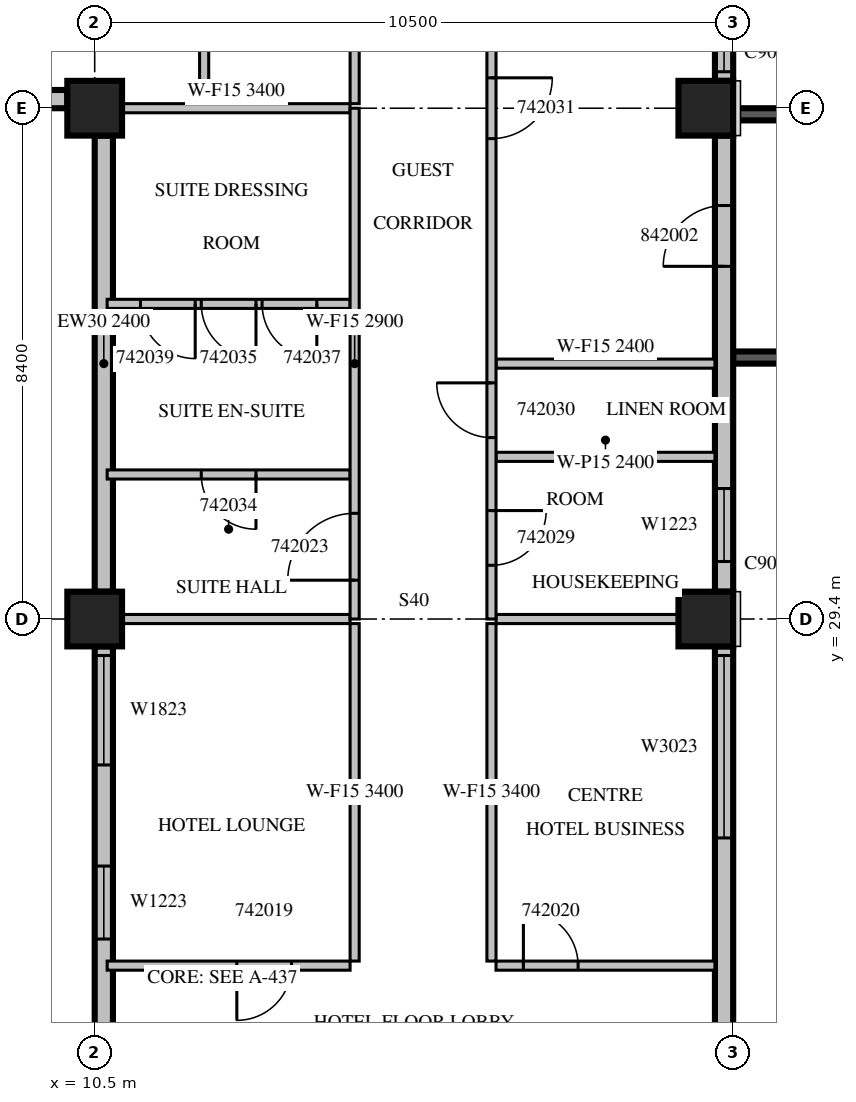
"""IFC4 building model, lengths in metres.
Left out: names, types, materials, properties, quantities, classifications, styles, units other than length and angle.
Written with IfcOpenShell. Run it as: python <this file> out.ifc"""

import sys

from ifc_helpers import new_model, si_unit, direction, frame, frame_2d, origin, origin_2d, place, context, subcontext, project, spatial, rectangle, extrude, source, transform, mapped, element, fill, save


model = new_model("IFC4")
c1 = context("Model", 3, precision=1e-05, world=origin(), true_north=direction((0.0, 1.0)))
c2 = subcontext(c1, "Body", "Model", "MODEL_VIEW")
j1 = project(units=[si_unit("LENGTHUNIT", "METRE"), si_unit("PLANEANGLEUNIT", "RADIAN")], contexts=[c1])
p1 = place(None, origin())
s1 = spatial("IfcSite", under=j1, at=p1, CompositionType="ELEMENT")
p2 = place(p1, origin())
s2 = spatial("IfcBuilding", under=s1, at=p2, CompositionType="ELEMENT")
p3 = place(p2, frame((0.0, 0.0, 193.0)))
s3 = spatial("IfcBuildingStorey", under=s2, at=p3, CompositionType="ELEMENT", Elevation=193.0)
m1 = source(origin(), c2, "Body", "SweptSolid", [
    extrude(rectangle(XDim=0.9, YDim=0.9, at=origin_2d()), origin(), (0.0, 0.0, 1.0), 3.8),
])
for number, where, z_axis, x_axis in (
    (1, (10.5, 29.4, 0.0), (0.0, 0.0, 1.0), (1.0, 0.0, 0.0)),
    (2, (20.55, 29.4, 0.0), (0.0, 0.0, 1.0), (1.0, 0.0, 0.0)),
    (3, (10.5, 37.8, 0.0), (0.0, 0.0, 1.0), (1.0, 0.0, 0.0)),
    (4, (20.55, 37.8, 0.0), (0.0, 0.0, 1.0), (1.0, 0.0, 0.0)),
):
    element("IfcColumn", number, at=place(p3, frame(where, z_axis=z_axis, x_axis=x_axis)), inside=s3, PredefinedType="COLUMN", context=c2, shape_type="MappedRepresentation", body=[
        mapped(m1, transform((0.0, 0.0, 0.0), scale=1.0)),
    ])
m2 = source(origin(), c2, "Body", "SweptSolid", [
    extrude(rectangle(XDim=3.9, YDim=0.2, at=frame_2d((1.95, 0.0))), origin(), (0.0, 0.0, 1.0), 3.4),
])
p4 = place(p3, frame((21.0, 33.7, 0.0), z_axis=(0.0, 0.0, 1.0), x_axis=(1.0, 0.0, 0.0)))
e5 = element("IfcWall", 5, at=p4, inside=s3, PredefinedType="SOLIDWALL", context=c2, shape_type="MappedRepresentation", body=[
    mapped(m2, transform((0.0, 0.0, 0.0), scale=1.0)),
])
m3 = source(origin(), c2, "Body", "SweptSolid", [
    extrude(rectangle(XDim=2.4, YDim=2.3, at=frame_2d((1.2, 1.15))), frame((0.0, 0.11, 0.0), z_axis=(0.0, -1.0, 0.0), x_axis=(1.0, 0.0, 0.0)), (0.0, 0.0, 1.0), 0.22),
])
p5 = place(p4, frame((0.75, 0.0, 0.6)))
e6 = element("IfcOpeningElement", 6, at=p5, cuts=e5, PredefinedType="OPENING", context=c2, shape_type="MappedRepresentation", body=[
    mapped(m3, transform((0.0, 0.0, 0.0), scale=1.0)),
])
p6 = place(p3, frame((21.0, 37.7, 0.0), z_axis=(0.0, 0.0, 1.0), x_axis=(1.0, 0.0, 0.0)))
e7 = element("IfcWall", 7, at=p6, inside=s3, PredefinedType="SOLIDWALL", context=c2, shape_type="MappedRepresentation", body=[
    mapped(m2, transform((0.0, 0.0, 0.0), scale=1.0)),
])
p7 = place(p6, frame((0.75, 0.0, 0.6)))
e8 = element("IfcOpeningElement", 8, at=p7, cuts=e7, PredefinedType="OPENING", context=c2, shape_type="MappedRepresentation", body=[
    mapped(m3, transform((0.0, 0.0, 0.0), scale=1.0)),
])
m4 = source(origin(), c2, "Body", "SweptSolid", [
    extrude(rectangle(XDim=7.15, YDim=0.3, at=frame_2d((3.575, 0.0))), origin(), (0.0, 0.0, 1.0), 3.4),
])
p8 = place(p3, frame((20.85, 21.8, 0.0), z_axis=(0.0, 0.0, 1.0), x_axis=(0.0, 1.0, 0.0)))
e9 = element("IfcWall", 9, at=p8, inside=s3, PredefinedType="STANDARD", context=c2, shape_type="MappedRepresentation", body=[
    mapped(m4, transform((0.0, 0.0, 0.0), scale=1.0)),
])
m5 = source(origin(), c2, "Body", "SweptSolid", [
    extrude(rectangle(XDim=3.0, YDim=2.3, at=frame_2d((1.5, 1.15))), frame((0.0, 0.16, 0.0), z_axis=(0.0, -1.0, 0.0), x_axis=(1.0, 0.0, 0.0)), (0.0, 0.0, 1.0), 0.32),
])
p9 = place(p8, frame((4.0, 0.0, 0.6)))
e10 = element("IfcOpeningElement", 10, at=p9, cuts=e9, PredefinedType="OPENING", context=c2, shape_type="MappedRepresentation", body=[
    mapped(m5, transform((0.0, 0.0, 0.0), scale=1.0)),
])
m6 = source(origin(), c2, "Body", "SweptSolid", [
    extrude(rectangle(XDim=7.5, YDim=0.3, at=frame_2d((3.75, 0.0))), origin(), (0.0, 0.0, 1.0), 3.4),
])
p10 = place(p3, frame((20.85, 29.85, 0.0), z_axis=(0.0, 0.0, 1.0), x_axis=(0.0, 1.0, 0.0)))
e11 = element("IfcWall", 11, at=p10, inside=s3, PredefinedType="STANDARD", context=c2, shape_type="MappedRepresentation", body=[
    mapped(m6, transform((0.0, 0.0, 0.0), scale=1.0)),
])
m7 = source(origin(), c2, "Body", "SweptSolid", [
    extrude(rectangle(XDim=1.2, YDim=2.3, at=frame_2d((0.6, 1.15))), frame((0.0, 0.16, 0.0), z_axis=(0.0, -1.0, 0.0), x_axis=(1.0, 0.0, 0.0)), (0.0, 0.0, 1.0), 0.32),
])
p11 = place(p10, frame((0.496, 0.0, 0.6)))
e12 = element("IfcOpeningElement", 12, at=p11, cuts=e11, PredefinedType="OPENING", context=c2, shape_type="MappedRepresentation", body=[
    mapped(m7, transform((0.0, 0.0, 0.0), scale=1.0)),
])
m8 = source(origin(), c2, "Body", "SweptSolid", [
    extrude(rectangle(XDim=1.0, YDim=2.1, at=frame_2d((0.5, 1.05))), frame((0.0, 0.16, 0.0), z_axis=(0.0, -1.0, 0.0), x_axis=(1.0, 0.0, 0.0)), (0.0, 0.0, 1.0), 0.32),
])
p12 = place(p10, frame((5.35, 0.0, 0.0)))
e13 = element("IfcOpeningElement", 13, at=p12, cuts=e11, PredefinedType="OPENING", context=c2, shape_type="MappedRepresentation", body=[
    mapped(m8, transform((0.0, 0.0, 0.0), scale=1.0)),
])
m9 = source(origin(), c2, "Body", "SweptSolid", [
    extrude(rectangle(XDim=3.75, YDim=0.3, at=frame_2d((1.875, 0.0))), origin(), (0.0, 0.0, 1.0), 3.4),
])
p13 = place(p3, frame((20.85, 38.25, 0.0), z_axis=(0.0, 0.0, 1.0), x_axis=(0.0, 1.0, 0.0)))
e14 = element("IfcWall", 14, at=p13, inside=s3, PredefinedType="STANDARD", context=c2, shape_type="MappedRepresentation", body=[
    mapped(m9, transform((0.0, 0.0, 0.0), scale=1.0)),
])
p14 = place(p13, frame((0.15, 0.0, 0.6)))
e15 = element("IfcOpeningElement", 15, at=p14, cuts=e14, PredefinedType="OPENING", context=c2, shape_type="MappedRepresentation", body=[
    mapped(m5, transform((0.0, 0.0, 0.0), scale=1.0)),
])
m10 = source(origin(), c2, "Body", "SweptSolid", [
    extrude(rectangle(XDim=1.35, YDim=0.3, at=frame_2d((0.675, 0.0))), origin(), (0.0, 0.0, 1.0), 3.4),
])
p15 = place(p3, frame((8.7, 37.95, 0.0), z_axis=(0.0, 0.0, 1.0), x_axis=(1.0, 0.0, 0.0)))
e16 = element("IfcWall", 16, at=p15, inside=s3, PredefinedType="STANDARD", context=c2, shape_type="MappedRepresentation", body=[
    mapped(m10, transform((0.0, 0.0, 0.0), scale=1.0)),
])
m11 = source(origin(), c2, "Body", "SweptSolid", [
    extrude(rectangle(XDim=7.5, YDim=0.3, at=frame_2d((3.75, 0.0))), origin(), (0.0, 0.0, 1.0), 2.4),
])
p16 = place(p3, frame((10.65, 37.35, 0.0), z_axis=(0.0, 0.0, 1.0), x_axis=(0.0, -1.0, 0.0)))
e17 = element("IfcWall", 17, at=p16, inside=s3, PredefinedType="STANDARD", context=c2, shape_type="MappedRepresentation", body=[
    mapped(m11, transform((0.0, 0.0, 0.0), scale=1.0)),
])
p17 = place(p3, frame((10.65, 28.95, 0.0), z_axis=(0.0, 0.0, 1.0), x_axis=(0.0, -1.0, 0.0)))
e18 = element("IfcWall", 18, at=p17, inside=s3, PredefinedType="STANDARD", context=c2, shape_type="MappedRepresentation", body=[
    mapped(m4, transform((0.0, 0.0, 0.0), scale=1.0)),
])
m12 = source(origin(), c2, "Body", "SweptSolid", [
    extrude(rectangle(XDim=1.8, YDim=2.3, at=frame_2d((0.9, 1.15))), frame((0.0, 0.16, 0.0), z_axis=(0.0, -1.0, 0.0), x_axis=(1.0, 0.0, 0.0)), (0.0, 0.0, 1.0), 0.32),
])
p18 = place(p17, frame((0.15, 0.0, 0.6)))
e19 = element("IfcOpeningElement", 19, at=p18, cuts=e18, PredefinedType="OPENING", context=c2, shape_type="MappedRepresentation", body=[
    mapped(m12, transform((0.0, 0.0, 0.0), scale=1.0)),
])
p19 = place(p17, frame((3.612, 0.0, 0.6)))
e20 = element("IfcOpeningElement", 20, at=p19, cuts=e18, PredefinedType="OPENING", context=c2, shape_type="MappedRepresentation", body=[
    mapped(m7, transform((0.0, 0.0, 0.0), scale=1.0)),
])
p20 = place(p3, frame((10.705, 23.7, 0.0), z_axis=(0.0, 0.0, 1.0), x_axis=(1.0, 0.0, 0.0)))
e21 = element("IfcWall", 21, at=p20, inside=s3, PredefinedType="PARTITIONING", context=c2, shape_type="SweptSolid", body=[
    extrude(rectangle(XDim=3.995, YDim=0.15, at=frame_2d((1.998, 0.0))), origin(), (0.0, 0.0, 1.0), 3.4),
])
m13 = source(origin(), c2, "Body", "SweptSolid", [
    extrude(rectangle(XDim=0.9, YDim=2.1, at=frame_2d((0.45, 1.05))), frame((0.0, 0.085, 0.0), z_axis=(0.0, -1.0, 0.0), x_axis=(1.0, 0.0, 0.0)), (0.0, 0.0, 1.0), 0.17),
])
p21 = place(p20, frame((2.132, 0.0, 0.0)))
e22 = element("IfcOpeningElement", 22, at=p21, cuts=e21, PredefinedType="OPENING", context=c2, shape_type="MappedRepresentation", body=[
    mapped(m13, transform((0.0, 0.0, 0.0), scale=1.0)),
])
m14 = source(origin(), c2, "Body", "SweptSolid", [
    extrude(rectangle(XDim=3.6, YDim=0.15, at=frame_2d((1.8, 0.0))), origin(), (0.0, 0.0, 1.0), 3.4),
])
p22 = place(p3, frame((17.1, 23.7, 0.0), z_axis=(0.0, 0.0, 1.0), x_axis=(1.0, 0.0, 0.0)))
e23 = element("IfcWall", 23, at=p22, inside=s3, PredefinedType="PARTITIONING", context=c2, shape_type="MappedRepresentation", body=[
    mapped(m14, transform((0.0, 0.0, 0.0), scale=1.0)),
])
p23 = place(p22, frame((0.45, 0.0, 0.0)))
e24 = element("IfcOpeningElement", 24, at=p23, cuts=e23, PredefinedType="OPENING", context=c2, shape_type="MappedRepresentation", body=[
    mapped(m13, transform((0.0, 0.0, 0.0), scale=1.0)),
])
m15 = source(origin(), c2, "Body", "SweptSolid", [
    extrude(rectangle(XDim=5.55, YDim=0.15, at=frame_2d((2.775, 0.0))), origin(), (0.0, 0.0, 1.0), 3.4),
])
for number, where, z_axis, x_axis in (
    (25, (14.775, 23.775, 0.0), (0.0, 0.0, 1.0), (0.0, 1.0, 0.0)),
    (26, (17.025, 29.325, 0.0), (0.0, 0.0, 1.0), (0.0, -1.0, 0.0)),
):
    element("IfcWall", number, at=place(p3, frame(where, z_axis=z_axis, x_axis=x_axis)), inside=s3, PredefinedType="PARTITIONING", context=c2, shape_type="MappedRepresentation", body=[
        mapped(m15, transform((0.0, 0.0, 0.0), scale=1.0)),
    ])
m16 = source(origin(), c2, "Body", "SweptSolid", [
    extrude(rectangle(XDim=3.751, YDim=0.15, at=frame_2d((1.875, 0.0))), origin(), (0.0, 0.0, 1.0), 3.4),
])
p24 = place(p3, frame((14.7, 29.4, 0.0), z_axis=(0.0, 0.0, 1.0), x_axis=(-1.0, 0.0, 0.0)))
e27 = element("IfcWall", 27, at=p24, inside=s3, PredefinedType="PARTITIONING", context=c2, shape_type="MappedRepresentation", body=[
    mapped(m16, transform((0.0, 0.0, 0.0), scale=1.0)),
])
m17 = source(origin(), c2, "Body", "SweptSolid", [
    extrude(rectangle(XDim=3.001, YDim=0.15, at=frame_2d((1.5, 0.0))), origin(), (0.0, 0.0, 1.0), 3.4),
])
p25 = place(p3, frame((20.101, 29.4, 0.0), z_axis=(0.0, 0.0, 1.0), x_axis=(-1.0, 0.0, 0.0)))
e28 = element("IfcWall", 28, at=p25, inside=s3, PredefinedType="PARTITIONING", context=c2, shape_type="MappedRepresentation", body=[
    mapped(m17, transform((0.0, 0.0, 0.0), scale=1.0)),
])
m18 = source(origin(), c2, "Body", "SweptSolid", [
    extrude(rectangle(XDim=6.45, YDim=0.15, at=frame_2d((3.225, 0.0))), origin(), (0.0, 0.0, 1.0), 3.4),
])
p26 = place(p3, frame((12.3, 44.325, 0.0), z_axis=(0.0, 0.0, 1.0), x_axis=(0.0, -1.0, 0.0)))
e29 = element("IfcWall", 29, at=p26, inside=s3, PredefinedType="PARTITIONING", context=c2, shape_type="MappedRepresentation", body=[
    mapped(m18, transform((0.0, 0.0, 0.0), scale=1.0)),
])
p27 = place(p3, frame((14.775, 37.875, 0.0), z_axis=(0.0, 0.0, 1.0), x_axis=(0.0, 1.0, 0.0)))
e30 = element("IfcWall", 30, at=p27, inside=s3, PredefinedType="PARTITIONING", context=c2, shape_type="MappedRepresentation", body=[
    mapped(m18, transform((0.0, 0.0, 0.0), scale=1.0)),
])
p28 = place(p27, frame((2.737, 0.0, 0.0)))
e31 = element("IfcOpeningElement", 31, at=p28, cuts=e30, PredefinedType="OPENING", context=c2, shape_type="MappedRepresentation", body=[
    mapped(m13, transform((0.0, 0.0, 0.0), scale=1.0)),
])
m19 = source(origin(), c2, "Body", "SweptSolid", [
    extrude(rectangle(XDim=3.995, YDim=0.15, at=frame_2d((1.998, 0.0))), origin(), (0.0, 0.0, 1.0), 3.4),
])
p29 = place(p3, frame((14.7, 31.777, 0.0), z_axis=(0.0, 0.0, 1.0), x_axis=(-1.0, 0.0, 0.0)))
e32 = element("IfcWall", 32, at=p29, inside=s3, PredefinedType="PARTITIONING", context=c2, shape_type="MappedRepresentation", body=[
    mapped(m19, transform((0.0, 0.0, 0.0), scale=1.0)),
])
p30 = place(p29, frame((1.548, 0.0, 0.0)))
e33 = element("IfcOpeningElement", 33, at=p30, cuts=e32, PredefinedType="OPENING", context=c2, shape_type="MappedRepresentation", body=[
    mapped(m13, transform((0.0, 0.0, 0.0), scale=1.0)),
])
p31 = place(p3, frame((14.7, 34.583, 0.0), z_axis=(0.0, 0.0, 1.0), x_axis=(-1.0, 0.0, 0.0)))
e34 = element("IfcWall", 34, at=p31, inside=s3, PredefinedType="PARTITIONING", context=c2, shape_type="MappedRepresentation", body=[
    mapped(m19, transform((0.0, 0.0, 0.0), scale=1.0)),
])
p32 = place(p31, frame((1.548, 0.0, 0.0)))
e35 = element("IfcOpeningElement", 35, at=p32, cuts=e34, PredefinedType="OPENING", context=c2, shape_type="MappedRepresentation", body=[
    mapped(m13, transform((0.0, 0.0, 0.0), scale=1.0)),
])
p33 = place(p31, frame((0.547, 0.0, 0.0)))
e36 = element("IfcOpeningElement", 36, at=p33, cuts=e34, PredefinedType="OPENING", context=c2, shape_type="MappedRepresentation", body=[
    mapped(m13, transform((0.0, 0.0, 0.0), scale=1.0)),
])
p34 = place(p31, frame((2.547, 0.0, 0.0)))
e37 = element("IfcOpeningElement", 37, at=p34, cuts=e34, PredefinedType="OPENING", context=c2, shape_type="MappedRepresentation", body=[
    mapped(m13, transform((0.0, 0.0, 0.0), scale=1.0)),
])
p35 = place(p3, frame((14.7, 37.8, 0.0), z_axis=(0.0, 0.0, 1.0), x_axis=(-1.0, 0.0, 0.0)))
e38 = element("IfcWall", 38, at=p35, inside=s3, PredefinedType="PARTITIONING", context=c2, shape_type="MappedRepresentation", body=[
    mapped(m16, transform((0.0, 0.0, 0.0), scale=1.0)),
])
m20 = source(origin(), c2, "Body", "SweptSolid", [
    extrude(rectangle(XDim=3.6, YDim=0.15, at=frame_2d((1.8, 0.0))), origin(), (0.0, 0.0, 1.0), 2.4),
])
for number, where, z_axis, x_axis in (
    (39, (17.1, 32.067, 0.0), (0.0, 0.0, 1.0), (1.0, 0.0, 0.0)),
    (40, (20.7, 33.6, 0.0), (0.0, 0.0, 1.0), (-1.0, 0.0, 0.0)),
):
    element("IfcWall", number, at=place(p3, frame(where, z_axis=z_axis, x_axis=x_axis)), inside=s3, PredefinedType="PARTITIONING", context=c2, shape_type="MappedRepresentation", body=[
        mapped(m20, transform((0.0, 0.0, 0.0), scale=1.0)),
    ])
m21 = source(origin(), c2, "Body", "SweptSolid", [
    extrude(rectangle(XDim=8.4, YDim=0.15, at=frame_2d((4.2, 0.0))), origin(), (0.0, 0.0, 1.0), 2.9),
])
p36 = place(p3, frame((14.775, 29.4, 0.0), z_axis=(0.0, 0.0, 1.0), x_axis=(0.0, 1.0, 0.0)))
e41 = element("IfcWall", 41, at=p36, inside=s3, PredefinedType="PARTITIONING", context=c2, shape_type="MappedRepresentation", body=[
    mapped(m21, transform((0.0, 0.0, 0.0), scale=1.0)),
])
m22 = source(origin(), c2, "Body", "SweptSolid", [
    extrude(rectangle(XDim=1.1, YDim=2.1, at=frame_2d((0.55, 1.05))), frame((0.0, 0.085, 0.0), z_axis=(0.0, -1.0, 0.0), x_axis=(1.0, 0.0, 0.0)), (0.0, 0.0, 1.0), 0.17),
])
p37 = place(p36, frame((0.638, 0.0, 0.0)))
e42 = element("IfcOpeningElement", 42, at=p37, cuts=e41, PredefinedType="OPENING", context=c2, shape_type="MappedRepresentation", body=[
    mapped(m22, transform((0.0, 0.0, 0.0), scale=1.0)),
])
m23 = source(origin(), c2, "Body", "SweptSolid", [
    extrude(rectangle(XDim=19.86, YDim=0.15, at=frame_2d((9.93, 0.0))), origin(), (0.0, 0.0, 1.0), 2.9),
])
p38 = place(p3, frame((17.025, 49.26, 0.0), z_axis=(0.0, 0.0, 1.0), x_axis=(0.0, -1.0, 0.0)))
e43 = element("IfcWall", 43, at=p38, inside=s3, PredefinedType="PARTITIONING", context=c2, shape_type="MappedRepresentation", body=[
    mapped(m23, transform((0.0, 0.0, 0.0), scale=1.0)),
])
p39 = place(p38, frame((18.076, 0.0, 0.0)))
e44 = element("IfcOpeningElement", 44, at=p39, cuts=e43, PredefinedType="OPENING", context=c2, shape_type="MappedRepresentation", body=[
    mapped(m13, transform((0.0, 0.0, 0.0), scale=1.0)),
])
p40 = place(p38, frame((15.976, 0.0, 0.0)))
e45 = element("IfcOpeningElement", 45, at=p40, cuts=e43, PredefinedType="OPENING", context=c2, shape_type="MappedRepresentation", body=[
    mapped(m13, transform((0.0, 0.0, 0.0), scale=1.0)),
])
m24 = source(origin(), c2, "Body", "SweptSolid", [
    extrude(rectangle(XDim=1.0, YDim=2.1, at=frame_2d((0.5, 1.05))), frame((0.0, 0.085, 0.0), z_axis=(0.0, -1.0, 0.0), x_axis=(1.0, 0.0, 0.0)), (0.0, 0.0, 1.0), 0.17),
])
p41 = place(p38, frame((10.96, 0.0, 0.0)))
e46 = element("IfcOpeningElement", 46, at=p41, cuts=e43, PredefinedType="OPENING", context=c2, shape_type="MappedRepresentation", body=[
    mapped(m24, transform((0.0, 0.0, 0.0), scale=1.0)),
])
m25 = source(origin(), c2, "Body", "SweptSolid", [
    extrude(rectangle(XDim=1.2, YDim=2.1, at=frame_2d((0.6, 1.05))), frame((0.0, 0.085, 0.0), z_axis=(0.0, -1.0, 0.0), x_axis=(1.0, 0.0, 0.0)), (0.0, 0.0, 1.0), 0.17),
])
p42 = place(p38, frame((2.993, 0.0, 0.0)))
e47 = element("IfcOpeningElement", 47, at=p42, cuts=e43, PredefinedType="OPENING", context=c2, shape_type="MappedRepresentation", body=[
    mapped(m25, transform((0.0, 0.0, 0.0), scale=1.0)),
])
m26 = source(origin(), c2, "Body", "SweptSolid", [
    extrude(rectangle(XDim=3.0, YDim=2.3, at=frame_2d((1.5, 1.15))), frame((0.0, 0.03, 0.0), z_axis=(0.0, -1.0, 0.0), x_axis=(1.0, 0.0, 0.0)), (0.0, 0.0, 1.0), 0.06),
])
p43 = place(p9, origin())
e48 = element("IfcWindow", 48, at=p43, inside=s3, PartitioningType="SINGLE_PANEL", PredefinedType="WINDOW", context=c2, shape_type="MappedRepresentation", body=[
    mapped(m26, transform((0.0, 0.0, 0.0), scale=1.0)),
])
fill(e10, e48)
m27 = source(origin(), c2, "Body", "SweptSolid", [
    extrude(rectangle(XDim=1.2, YDim=2.3, at=frame_2d((0.6, 1.15))), frame((0.0, 0.03, 0.0), z_axis=(0.0, -1.0, 0.0), x_axis=(1.0, 0.0, 0.0)), (0.0, 0.0, 1.0), 0.06),
])
p44 = place(p11, origin())
e49 = element("IfcWindow", 49, at=p44, inside=s3, PartitioningType="SINGLE_PANEL", PredefinedType="WINDOW", context=c2, shape_type="MappedRepresentation", body=[
    mapped(m27, transform((0.0, 0.0, 0.0), scale=1.0)),
])
fill(e12, e49)
p45 = place(p14, origin())
e50 = element("IfcWindow", 50, at=p45, inside=s3, PartitioningType="SINGLE_PANEL", PredefinedType="WINDOW", context=c2, shape_type="MappedRepresentation", body=[
    mapped(m26, transform((0.0, 0.0, 0.0), scale=1.0)),
])
fill(e15, e50)
m28 = source(origin(), c2, "Body", "SweptSolid", [
    extrude(rectangle(XDim=1.8, YDim=2.3, at=frame_2d((0.9, 1.15))), frame((0.0, 0.03, 0.0), z_axis=(0.0, -1.0, 0.0), x_axis=(1.0, 0.0, 0.0)), (0.0, 0.0, 1.0), 0.06),
])
p46 = place(p18, origin())
e51 = element("IfcWindow", 51, at=p46, inside=s3, PartitioningType="SINGLE_PANEL", PredefinedType="WINDOW", context=c2, shape_type="MappedRepresentation", body=[
    mapped(m28, transform((0.0, 0.0, 0.0), scale=1.0)),
])
fill(e19, e51)
p47 = place(p19, origin())
e52 = element("IfcWindow", 52, at=p47, inside=s3, PartitioningType="SINGLE_PANEL", PredefinedType="WINDOW", context=c2, shape_type="MappedRepresentation", body=[
    mapped(m27, transform((0.0, 0.0, 0.0), scale=1.0)),
])
fill(e20, e52)
m29 = source(origin(), c2, "Body", "SweptSolid", [
    extrude(rectangle(XDim=0.9, YDim=2.1, at=frame_2d((0.45, 1.05))), frame((0.0, 0.025, 0.0), z_axis=(0.0, -1.0, 0.0), x_axis=(1.0, 0.0, 0.0)), (0.0, 0.0, 1.0), 0.05),
])
p48 = place(p21, origin())
e53 = element("IfcDoor", 53, at=p48, inside=s3, OperationType="SINGLE_SWING_RIGHT", PredefinedType="DOOR", context=c2, shape_type="MappedRepresentation", body=[
    mapped(m29, transform((0.0, 0.0, 0.0), scale=1.0)),
])
fill(e22, e53)
p49 = place(p23, origin())
e54 = element("IfcDoor", 54, at=p49, inside=s3, OperationType="SINGLE_SWING_LEFT", PredefinedType="DOOR", context=c2, shape_type="MappedRepresentation", body=[
    mapped(m29, transform((0.0, 0.0, 0.0), scale=1.0)),
])
fill(e24, e54)
m30 = source(origin(), c2, "Body", "SweptSolid", [
    extrude(rectangle(XDim=1.1, YDim=2.1, at=frame_2d((0.55, 1.05))), frame((0.0, 0.025, 0.0), z_axis=(0.0, -1.0, 0.0), x_axis=(1.0, 0.0, 0.0)), (0.0, 0.0, 1.0), 0.05),
])
p50 = place(p37, origin())
e55 = element("IfcDoor", 55, at=p50, inside=s3, OperationType="SINGLE_SWING_LEFT", PredefinedType="DOOR", context=c2, shape_type="MappedRepresentation", body=[
    mapped(m30, transform((0.0, 0.0, 0.0), scale=1.0)),
])
fill(e42, e55)
p51 = place(p39, origin())
e56 = element("IfcDoor", 56, at=p51, inside=s3, OperationType="SINGLE_SWING_LEFT", PredefinedType="DOOR", context=c2, shape_type="MappedRepresentation", body=[
    mapped(m29, transform((0.0, 0.0, 0.0), scale=1.0)),
])
fill(e44, e56)
p52 = place(p40, origin())
e57 = element("IfcDoor", 57, at=p52, inside=s3, OperationType="SINGLE_SWING_RIGHT", PredefinedType="DOOR", context=c2, shape_type="MappedRepresentation", body=[
    mapped(m29, transform((0.0, 0.0, 0.0), scale=1.0)),
])
fill(e45, e57)
m31 = source(origin(), c2, "Body", "SweptSolid", [
    extrude(rectangle(XDim=1.0, YDim=2.1, at=frame_2d((0.5, 1.05))), frame((0.0, 0.025, 0.0), z_axis=(0.0, -1.0, 0.0), x_axis=(1.0, 0.0, 0.0)), (0.0, 0.0, 1.0), 0.05),
])
p53 = place(p41, origin())
e58 = element("IfcDoor", 58, at=p53, inside=s3, OperationType="SINGLE_SWING_LEFT", PredefinedType="DOOR", context=c2, shape_type="MappedRepresentation", body=[
    mapped(m31, transform((0.0, 0.0, 0.0), scale=1.0)),
])
fill(e46, e58)
p54 = place(p30, origin())
e59 = element("IfcDoor", 59, at=p54, inside=s3, OperationType="SINGLE_SWING_LEFT", PredefinedType="DOOR", context=c2, shape_type="MappedRepresentation", body=[
    mapped(m29, transform((0.0, 0.0, 0.0), scale=1.0)),
])
fill(e33, e59)
p55 = place(p32, origin())
e60 = element("IfcDoor", 60, at=p55, inside=s3, OperationType="SINGLE_SWING_LEFT", PredefinedType="DOOR", context=c2, shape_type="MappedRepresentation", body=[
    mapped(m29, transform((0.0, 0.0, 0.0), scale=1.0)),
])
fill(e35, e60)
p56 = place(p33, origin())
e61 = element("IfcDoor", 61, at=p56, inside=s3, OperationType="SINGLE_SWING_LEFT", PredefinedType="DOOR", context=c2, shape_type="MappedRepresentation", body=[
    mapped(m29, transform((0.0, 0.0, 0.0), scale=1.0)),
])
fill(e36, e61)
p57 = place(p34, origin())
e62 = element("IfcDoor", 62, at=p57, inside=s3, OperationType="SINGLE_SWING_LEFT", PredefinedType="DOOR", context=c2, shape_type="MappedRepresentation", body=[
    mapped(m29, transform((0.0, 0.0, 0.0), scale=1.0)),
])
fill(e37, e62)
p58 = place(p12, origin())
e63 = element("IfcDoor", 63, at=p58, inside=s3, OperationType="SINGLE_SWING_LEFT", PredefinedType="DOOR", context=c2, shape_type="MappedRepresentation", body=[
    mapped(m31, transform((0.0, 0.0, 0.0), scale=1.0)),
])
fill(e13, e63)
save(model, sys.argv[1])
